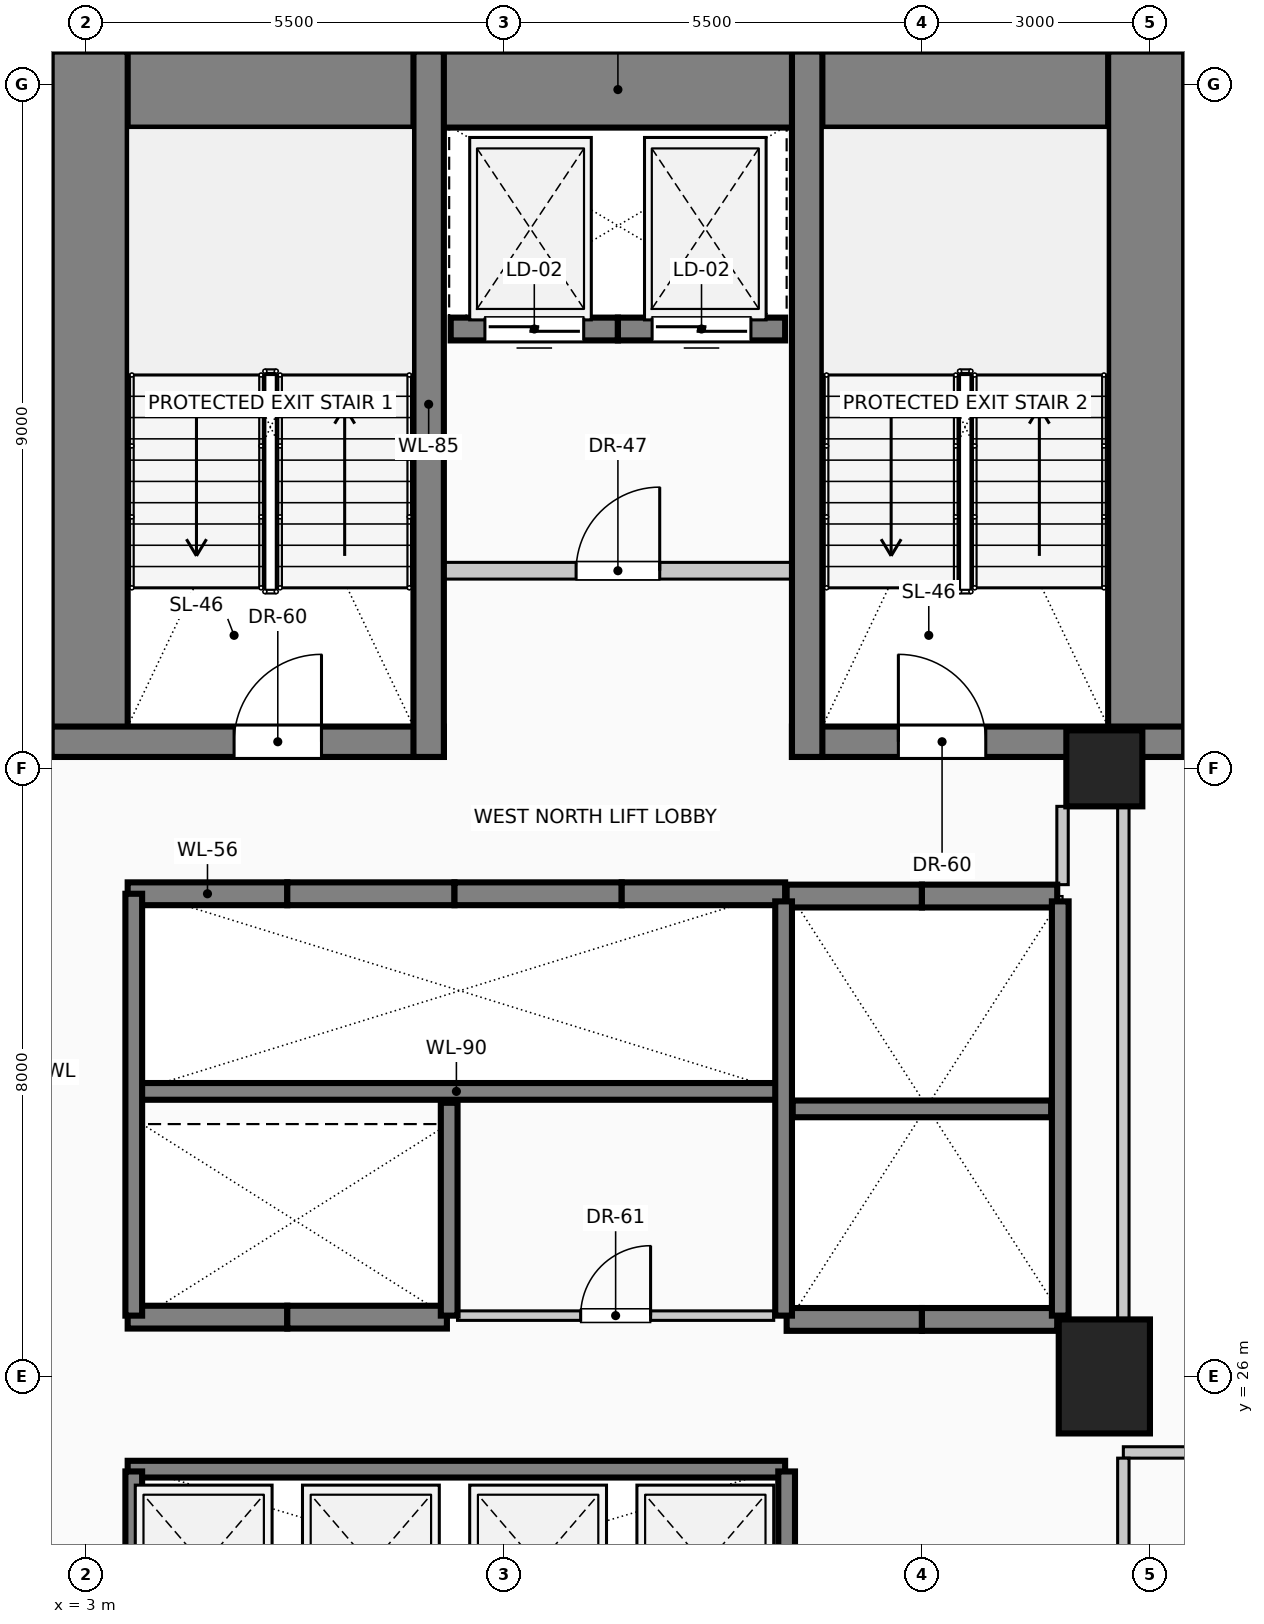
"""IFC4 building model, lengths in metres.
Left out: names, types, materials, properties, quantities, classifications, styles, units other than length and angle.
Written with IfcOpenShell. Run it as: python <this file> out.ifc"""

import sys

from ifc_helpers import new_model, si_unit, direction, frame, frame_2d, origin, origin_2d, place, context, subcontext, project, spatial, rectangle, circle, extrude, element, fill, save


model = new_model("IFC4")
c1 = context("Model", 3, precision=1e-05, world=origin(), true_north=direction((0.0, 1.0)))
c2 = subcontext(c1, "Body", "Model", "MODEL_VIEW")
j1 = project(units=[si_unit("LENGTHUNIT", "METRE"), si_unit("PLANEANGLEUNIT", "RADIAN")], contexts=[c1])
p1 = place(None, origin())
s1 = spatial("IfcSite", under=j1, at=p1, CompositionType="ELEMENT")
p2 = place(p1, origin())
s2 = spatial("IfcBuilding", under=s1, at=p2, CompositionType="ELEMENT")
p3 = place(p2, frame((0.0, 0.0, 62.6)))
s3 = spatial("IfcBuildingStorey", under=s2, at=p3, CompositionType="ELEMENT", Elevation=62.6)
p4 = place(p3, frame((2.55, 42.93, 0.0), z_axis=(0.0, 0.0, 1.0), x_axis=(1.0, 0.0, 0.0)))
e1 = element("IfcWall", 1, at=p4, inside=s3, PredefinedType="SHEAR", context=c2, shape_type="SweptSolid", body=[
    extrude(rectangle(XDim=14.9, YDim=1.0, at=frame_2d((7.45, 0.0))), origin(), (0.0, 0.0, 1.0), 4.0),
])
for number, where, z_axis, x_axis in (
    (2, (3.05, 34.15, 0.0), (0.0, 0.0, 1.0), (0.0, 1.0, 0.0)),
    (3, (16.95, 34.15, 0.0), (0.0, 0.0, 1.0), (0.0, 1.0, 0.0)),
):
    element("IfcWall", number, at=place(p3, frame(where, z_axis=z_axis, x_axis=x_axis)), inside=s3, PredefinedType="SHEAR", context=c2, shape_type="SweptSolid", body=[
        extrude(rectangle(XDim=9.28, YDim=1.0, at=frame_2d((4.64, 0.0))), origin(), (0.0, 0.0, 1.0), 4.0),
    ])
p5 = place(p3, frame((2.55, 34.35, 0.0), z_axis=(0.0, 0.0, 1.0), x_axis=(1.0, 0.0, 0.0)))
e4 = element("IfcWall", 4, at=p5, inside=s3, PredefinedType="SHEAR", context=c2, shape_type="SweptSolid", body=[
    extrude(rectangle(XDim=5.16, YDim=0.4, at=frame_2d((2.58, 0.0))), origin(), (0.0, 0.0, 1.0), 4.0),
])
p6 = place(p5, frame((2.4, 0.0, 0.0)))
e5 = element("IfcOpeningElement", 5, at=p6, cuts=e4, PredefinedType="OPENING", context=c2, shape_type="SweptSolid", body=[
    extrude(rectangle(XDim=1.15, YDim=2.2, at=frame_2d((0.575, 1.1))), frame((0.0, 0.21, 0.0), z_axis=(0.0, -1.0, 0.0), x_axis=(1.0, 0.0, 0.0)), (0.0, 0.0, 1.0), 0.42),
])
p7 = place(p3, frame((12.29, 34.35, 0.0), z_axis=(0.0, 0.0, 1.0), x_axis=(1.0, 0.0, 0.0)))
e6 = element("IfcWall", 6, at=p7, inside=s3, PredefinedType="SHEAR", context=c2, shape_type="SweptSolid", body=[
    extrude(rectangle(XDim=5.16, YDim=0.4, at=frame_2d((2.58, 0.0))), origin(), (0.0, 0.0, 1.0), 4.0),
])
p8 = place(p7, frame((1.4, 0.0, 0.0)))
e7 = element("IfcOpeningElement", 7, at=p8, cuts=e6, PredefinedType="OPENING", context=c2, shape_type="SweptSolid", body=[
    extrude(rectangle(XDim=1.15, YDim=2.2, at=frame_2d((0.575, 1.1))), frame((0.0, 0.21, 0.0), z_axis=(0.0, -1.0, 0.0), x_axis=(1.0, 0.0, 0.0)), (0.0, 0.0, 1.0), 0.42),
])
for number, where, z_axis, x_axis in (
    (8, (7.51, 34.15, 0.0), (0.0, 0.0, 1.0), (0.0, 1.0, 0.0)),
    (9, (12.49, 34.15, 0.0), (0.0, 0.0, 1.0), (0.0, 1.0, 0.0)),
):
    element("IfcWall", number, at=place(p3, frame(where, z_axis=z_axis, x_axis=x_axis)), inside=s3, PredefinedType="SHEAR", context=c2, shape_type="SweptSolid", body=[
        extrude(rectangle(XDim=9.28, YDim=0.4, at=frame_2d((4.64, 0.0))), origin(), (0.0, 0.0, 1.0), 4.0),
    ])
p9 = place(p3, frame((16.4, 26.0, 0.0), z_axis=(0.0, 0.0, 1.0), x_axis=(1.0, 0.0, 0.0)))
e10 = element("IfcColumn", 10, at=p9, inside=s3, PredefinedType="COLUMN", context=c2, shape_type="SweptSolid", body=[
    extrude(rectangle(XDim=1.2, YDim=1.5, at=origin_2d()), origin(), (0.0, 0.0, 1.0), 4.0),
])
p10 = place(p3, frame((16.4, 34.0, 0.0), z_axis=(0.0, 0.0, 1.0), x_axis=(1.0, 0.0, 0.0)))
e11 = element("IfcColumn", 11, at=p10, inside=s3, PredefinedType="COLUMN", context=c2, shape_type="SweptSolid", body=[
    extrude(circle(Radius=0.5, at=origin_2d()), origin(), (0.0, 0.0, 1.0), 4.0),
])
for number, where, z_axis, x_axis in (
    (12, (14.0, 26.75, 0.0), (0.0, 0.0, 1.0), (-1.0, 0.0, 0.0)),
    (13, (15.78, 26.75, 0.0), (0.0, 0.0, 1.0), (-1.0, 0.0, 0.0)),
    (14, (12.22, 32.32, 0.0), (0.0, 0.0, 1.0), (1.0, 0.0, 0.0)),
    (15, (14.0, 32.32, 0.0), (0.0, 0.0, 1.0), (1.0, 0.0, 0.0)),
):
    element("IfcWall", number, at=place(p3, frame(where, z_axis=z_axis, x_axis=x_axis)), inside=s3, PredefinedType="SOLIDWALL", context=c2, shape_type="SweptSolid", body=[
        extrude(rectangle(XDim=1.78, YDim=0.3, at=frame_2d((0.89, 0.0))), origin(), (0.0, 0.0, 1.0), 4.0),
    ])
p11 = place(p3, frame((3.55, 32.35, 0.0), z_axis=(0.0, 0.0, 1.0), x_axis=(1.0, 0.0, 0.0)))
e16 = element("IfcWall", 16, at=p11, inside=s3, PredefinedType="SOLIDWALL", context=c2, shape_type="SweptSolid", body=[
    extrude(rectangle(XDim=2.1, YDim=0.3, at=frame_2d((1.05, 0.0))), origin(), (0.0, 0.0, 1.0), 4.0),
])
p12 = place(p3, frame((5.65, 32.35, 0.0), z_axis=(0.0, 0.0, 1.0), x_axis=(1.0, 0.0, 0.0)))
e17 = element("IfcWall", 17, at=p12, inside=s3, PredefinedType="SOLIDWALL", context=c2, shape_type="SweptSolid", body=[
    extrude(rectangle(XDim=2.2, YDim=0.3, at=frame_2d((1.1, 0.0))), origin(), (0.0, 0.0, 1.0), 4.0),
])
p13 = place(p3, frame((7.85, 32.35, 0.0), z_axis=(0.0, 0.0, 1.0), x_axis=(1.0, 0.0, 0.0)))
e18 = element("IfcWall", 18, at=p13, inside=s3, PredefinedType="SOLIDWALL", context=c2, shape_type="SweptSolid", body=[
    extrude(rectangle(XDim=2.2, YDim=0.3, at=frame_2d((1.1, 0.0))), origin(), (0.0, 0.0, 1.0), 4.0),
])
p14 = place(p3, frame((10.05, 32.35, 0.0), z_axis=(0.0, 0.0, 1.0), x_axis=(1.0, 0.0, 0.0)))
e19 = element("IfcWall", 19, at=p14, inside=s3, PredefinedType="SOLIDWALL", context=c2, shape_type="SweptSolid", body=[
    extrude(rectangle(XDim=2.15, YDim=0.3, at=frame_2d((1.075, 0.0))), origin(), (0.0, 0.0, 1.0), 4.0),
])
p15 = place(p3, frame((5.65, 26.78, 0.0), z_axis=(0.0, 0.0, 1.0), x_axis=(-1.0, 0.0, 0.0)))
e20 = element("IfcWall", 20, at=p15, inside=s3, PredefinedType="SOLIDWALL", context=c2, shape_type="SweptSolid", body=[
    extrude(rectangle(XDim=2.1, YDim=0.3, at=frame_2d((1.05, 0.0))), origin(), (0.0, 0.0, 1.0), 4.0),
])
p16 = place(p3, frame((7.75, 26.78, 0.0), z_axis=(0.0, 0.0, 1.0), x_axis=(-1.0, 0.0, 0.0)))
e21 = element("IfcWall", 21, at=p16, inside=s3, PredefinedType="SOLIDWALL", context=c2, shape_type="SweptSolid", body=[
    extrude(rectangle(XDim=2.1, YDim=0.3, at=frame_2d((1.05, 0.0))), origin(), (0.0, 0.0, 1.0), 4.0),
])
p17 = place(p3, frame((10.0, 39.78, 0.0), z_axis=(0.0, 0.0, 1.0), x_axis=(-1.0, 0.0, 0.0)))
e22 = element("IfcWall", 22, at=p17, inside=s3, PredefinedType="SOLIDWALL", context=c2, shape_type="SweptSolid", body=[
    extrude(rectangle(XDim=2.2, YDim=0.3, at=frame_2d((1.1, 0.0))), origin(), (0.0, 0.0, 1.0), 4.0),
])
p18 = place(p17, frame((0.45, 0.0, 0.0)))
e23 = element("IfcOpeningElement", 23, at=p18, cuts=e22, PredefinedType="OPENING", context=c2, shape_type="SweptSolid", body=[
    extrude(rectangle(XDim=1.3, YDim=2.25, at=frame_2d((0.65, 1.125))), frame((0.0, 0.16, 0.0), z_axis=(0.0, -1.0, 0.0), x_axis=(1.0, 0.0, 0.0)), (0.0, 0.0, 1.0), 0.32),
])
p19 = place(p3, frame((12.2, 39.78, 0.0), z_axis=(0.0, 0.0, 1.0), x_axis=(-1.0, 0.0, 0.0)))
e24 = element("IfcWall", 24, at=p19, inside=s3, PredefinedType="SOLIDWALL", context=c2, shape_type="SweptSolid", body=[
    extrude(rectangle(XDim=2.2, YDim=0.3, at=frame_2d((1.1, 0.0))), origin(), (0.0, 0.0, 1.0), 4.0),
])
p20 = place(p19, frame((0.45, 0.0, 0.0)))
e25 = element("IfcOpeningElement", 25, at=p20, cuts=e24, PredefinedType="OPENING", context=c2, shape_type="SweptSolid", body=[
    extrude(rectangle(XDim=1.3, YDim=2.25, at=frame_2d((0.65, 1.125))), frame((0.0, 0.16, 0.0), z_axis=(0.0, -1.0, 0.0), x_axis=(1.0, 0.0, 0.0)), (0.0, 0.0, 1.0), 0.32),
])
p21 = place(p3, frame((3.55, 29.75, 0.0), z_axis=(0.0, 0.0, 1.0), x_axis=(1.0, 0.0, 0.0)))
e26 = element("IfcWall", 26, at=p21, inside=s3, PredefinedType="SOLIDWALL", context=c2, shape_type="SweptSolid", body=[
    extrude(rectangle(XDim=8.65, YDim=0.22, at=frame_2d((4.325, 0.0))), origin(), (0.0, 0.0, 1.0), 4.0),
])
p22 = place(p3, frame((3.63, 26.8, 0.0), z_axis=(0.0, 0.0, 1.0), x_axis=(0.0, 1.0, 0.0)))
e27 = element("IfcWall", 27, at=p22, inside=s3, PredefinedType="SOLIDWALL", context=c2, shape_type="SweptSolid", body=[
    extrude(rectangle(XDim=5.55, YDim=0.22, at=frame_2d((2.775, 0.0))), origin(), (0.0, 0.0, 1.0), 4.0),
])
p23 = place(p3, frame((7.78, 26.8, 0.0), z_axis=(0.0, 0.0, 1.0), x_axis=(0.0, 1.0, 0.0)))
e28 = element("IfcWall", 28, at=p23, inside=s3, PredefinedType="SOLIDWALL", context=c2, shape_type="SweptSolid", body=[
    extrude(rectangle(XDim=2.8, YDim=0.22, at=frame_2d((1.4, 0.0))), origin(), (0.0, 0.0, 1.0), 4.0),
])
for number, where, z_axis, x_axis in (
    (29, (12.18, 26.8, 0.0), (0.0, 0.0, 1.0), (0.0, 1.0, 0.0)),
    (30, (15.82, 26.8, 0.0), (0.0, 0.0, 1.0), (0.0, 1.0, 0.0)),
):
    element("IfcWall", number, at=place(p3, frame(where, z_axis=z_axis, x_axis=x_axis)), inside=s3, PredefinedType="SOLIDWALL", context=c2, shape_type="SweptSolid", body=[
        extrude(rectangle(XDim=5.45, YDim=0.22, at=frame_2d((2.725, 0.0))), origin(), (0.0, 0.0, 1.0), 4.0),
    ])
p24 = place(p3, frame((12.3, 29.52, 0.0), z_axis=(0.0, 0.0, 1.0), x_axis=(1.0, 0.0, 0.0)))
e31 = element("IfcWall", 31, at=p24, inside=s3, PredefinedType="SOLIDWALL", context=c2, shape_type="SweptSolid", body=[
    extrude(rectangle(XDim=3.4, YDim=0.22, at=frame_2d((1.7, 0.0))), origin(), (0.0, 0.0, 1.0), 4.0),
])
p25 = place(p3, frame((3.55, 24.78, 0.0), z_axis=(0.0, 0.0, 1.0), x_axis=(1.0, 0.0, 0.0)))
e32 = element("IfcWall", 32, at=p25, inside=s3, PredefinedType="SOLIDWALL", context=c2, shape_type="SweptSolid", body=[
    extrude(rectangle(XDim=8.65, YDim=0.22, at=frame_2d((4.325, 0.0))), origin(), (0.0, 0.0, 1.0), 4.0),
])
for number, where, z_axis, x_axis in (
    (33, (3.63, 22.3, 0.0), (0.0, 0.0, 1.0), (0.0, 1.0, 0.0)),
    (34, (12.22, 22.3, 0.0), (0.0, 0.0, 1.0), (0.0, 1.0, 0.0)),
):
    element("IfcWall", number, at=place(p3, frame(where, z_axis=z_axis, x_axis=x_axis)), inside=s3, PredefinedType="SOLIDWALL", context=c2, shape_type="SweptSolid", body=[
        extrude(rectangle(XDim=2.45, YDim=0.22, at=frame_2d((1.225, 0.0))), origin(), (0.0, 0.0, 1.0), 4.0),
    ])
p26 = place(p3, frame((7.51, 36.6, 0.0), z_axis=(0.0, 0.0, 1.0), x_axis=(1.0, 0.0, 0.0)))
e35 = element("IfcWall", 35, at=p26, inside=s3, PredefinedType="PARTITIONING", context=c2, shape_type="SweptSolid", body=[
    extrude(rectangle(XDim=4.98, YDim=0.22, at=frame_2d((2.49, 0.0))), origin(), (0.0, 0.0, 1.0), 3.7),
])
p27 = place(p26, frame((1.94, 0.0, 0.0)))
e36 = element("IfcOpeningElement", 36, at=p27, cuts=e35, PredefinedType="OPENING", context=c2, shape_type="SweptSolid", body=[
    extrude(rectangle(XDim=1.1, YDim=2.2, at=frame_2d((0.55, 1.1))), frame((0.0, 0.12, 0.0), z_axis=(0.0, -1.0, 0.0), x_axis=(1.0, 0.0, 0.0)), (0.0, 0.0, 1.0), 0.24),
])
p28 = place(p3, frame((16.65, 25.0, 0.0), z_axis=(0.0, 0.0, 1.0), x_axis=(1.0, 0.0, 0.0)))
e37 = element("IfcWall", 37, at=p28, inside=s3, PredefinedType="PARTITIONING", context=c2, shape_type="SweptSolid", body=[
    extrude(rectangle(XDim=8.75, YDim=0.15, at=frame_2d((4.375, 0.0))), origin(), (0.0, 0.0, 1.0), 3.7),
])
p29 = place(p3, frame((7.89, 26.8, 0.0), z_axis=(0.0, 0.0, 1.0), x_axis=(1.0, 0.0, 0.0)))
e38 = element("IfcWall", 38, at=p29, inside=s3, PredefinedType="PARTITIONING", context=c2, shape_type="SweptSolid", body=[
    extrude(rectangle(XDim=4.16, YDim=0.125, at=frame_2d((2.08, 0.0))), origin(), (0.0, 0.0, 1.0), 3.7),
])
p30 = place(p29, frame((1.62, 0.0, 0.0)))
e39 = element("IfcOpeningElement", 39, at=p30, cuts=e38, PredefinedType="OPENING", context=c2, shape_type="SweptSolid", body=[
    extrude(rectangle(XDim=0.92, YDim=2.1, at=frame_2d((0.46, 1.05))), frame((0.0, 0.073, 0.0), z_axis=(0.0, -1.0, 0.0), x_axis=(1.0, 0.0, 0.0)), (0.0, 0.0, 1.0), 0.145),
])
p31 = place(p3, frame((15.85, 32.47, 0.0), z_axis=(0.0, 0.0, 1.0), x_axis=(0.0, 1.0, 0.0)))
e40 = element("IfcWall", 40, at=p31, inside=s3, PredefinedType="PARTITIONING", context=c2, shape_type="SweptSolid", body=[
    extrude(rectangle(XDim=1.03, YDim=0.15, at=frame_2d((0.515, 0.0))), origin(), (0.0, 0.0, 1.0), 3.7),
])
p32 = place(p3, frame((16.65, 21.19, 0.0), z_axis=(0.0, 0.0, 1.0), x_axis=(0.0, 1.0, 0.0)))
e41 = element("IfcWall", 41, at=p32, inside=s3, PredefinedType="PARTITIONING", context=c2, shape_type="SweptSolid", body=[
    extrude(rectangle(XDim=3.735, YDim=0.15, at=frame_2d((1.868, 0.0))), origin(), (0.0, 0.0, 1.0), 2.995),
])
p33 = place(p3, frame((16.65, 26.75, 0.0), z_axis=(0.0, 0.0, 1.0), x_axis=(0.0, 1.0, 0.0)))
e42 = element("IfcWall", 42, at=p33, inside=s3, PredefinedType="PARTITIONING", context=c2, shape_type="SweptSolid", body=[
    extrude(rectangle(XDim=6.75, YDim=0.15, at=frame_2d((3.375, 0.0))), origin(), (0.0, 0.0, 1.0), 2.995),
])
p34 = place(p18, origin())
e43 = element("IfcDoor", 43, at=p34, inside=s3, OperationType="SLIDING_TO_LEFT", PredefinedType="DOOR", context=c2, shape_type="SweptSolid", body=[
    extrude(rectangle(XDim=1.3, YDim=2.25, at=frame_2d((0.65, 1.125))), frame((0.0, 0.025, 0.0), z_axis=(0.0, -1.0, 0.0), x_axis=(1.0, 0.0, 0.0)), (0.0, 0.0, 1.0), 0.05),
])
fill(e23, e43)
p35 = place(p20, origin())
e44 = element("IfcDoor", 44, at=p35, inside=s3, OperationType="SLIDING_TO_RIGHT", PredefinedType="DOOR", context=c2, shape_type="SweptSolid", body=[
    extrude(rectangle(XDim=1.3, YDim=2.25, at=frame_2d((0.65, 1.125))), frame((0.0, 0.025, 0.0), z_axis=(0.0, -1.0, 0.0), x_axis=(1.0, 0.0, 0.0)), (0.0, 0.0, 1.0), 0.05),
])
fill(e25, e44)
p36 = place(p6, origin())
e45 = element("IfcDoor", 45, at=p36, inside=s3, OperationType="SINGLE_SWING_RIGHT", PredefinedType="DOOR", context=c2, shape_type="SweptSolid", body=[
    extrude(rectangle(XDim=1.15, YDim=2.2, at=frame_2d((0.575, 1.1))), frame((0.0, 0.025, 0.0), z_axis=(0.0, -1.0, 0.0), x_axis=(1.0, 0.0, 0.0)), (0.0, 0.0, 1.0), 0.05),
])
fill(e5, e45)
p37 = place(p8, origin())
e46 = element("IfcDoor", 46, at=p37, inside=s3, OperationType="SINGLE_SWING_LEFT", PredefinedType="DOOR", context=c2, shape_type="SweptSolid", body=[
    extrude(rectangle(XDim=1.15, YDim=2.2, at=frame_2d((0.575, 1.1))), frame((0.0, 0.025, 0.0), z_axis=(0.0, -1.0, 0.0), x_axis=(1.0, 0.0, 0.0)), (0.0, 0.0, 1.0), 0.05),
])
fill(e7, e46)
p38 = place(p27, origin())
e47 = element("IfcDoor", 47, at=p38, inside=s3, OperationType="SINGLE_SWING_RIGHT", PredefinedType="DOOR", context=c2, shape_type="SweptSolid", body=[
    extrude(rectangle(XDim=1.1, YDim=2.2, at=frame_2d((0.55, 1.1))), frame((0.0, 0.025, 0.0), z_axis=(0.0, -1.0, 0.0), x_axis=(1.0, 0.0, 0.0)), (0.0, 0.0, 1.0), 0.05),
])
fill(e36, e47)
p39 = place(p30, origin())
e48 = element("IfcDoor", 48, at=p39, inside=s3, OperationType="SINGLE_SWING_RIGHT", PredefinedType="DOOR", context=c2, shape_type="SweptSolid", body=[
    extrude(rectangle(XDim=0.92, YDim=2.1, at=frame_2d((0.46, 1.05))), frame((0.0, 0.025, 0.0), z_axis=(0.0, -1.0, 0.0), x_axis=(1.0, 0.0, 0.0)), (0.0, 0.0, 1.0), 0.05),
])
fill(e39, e48)
save(model, sys.argv[1])
